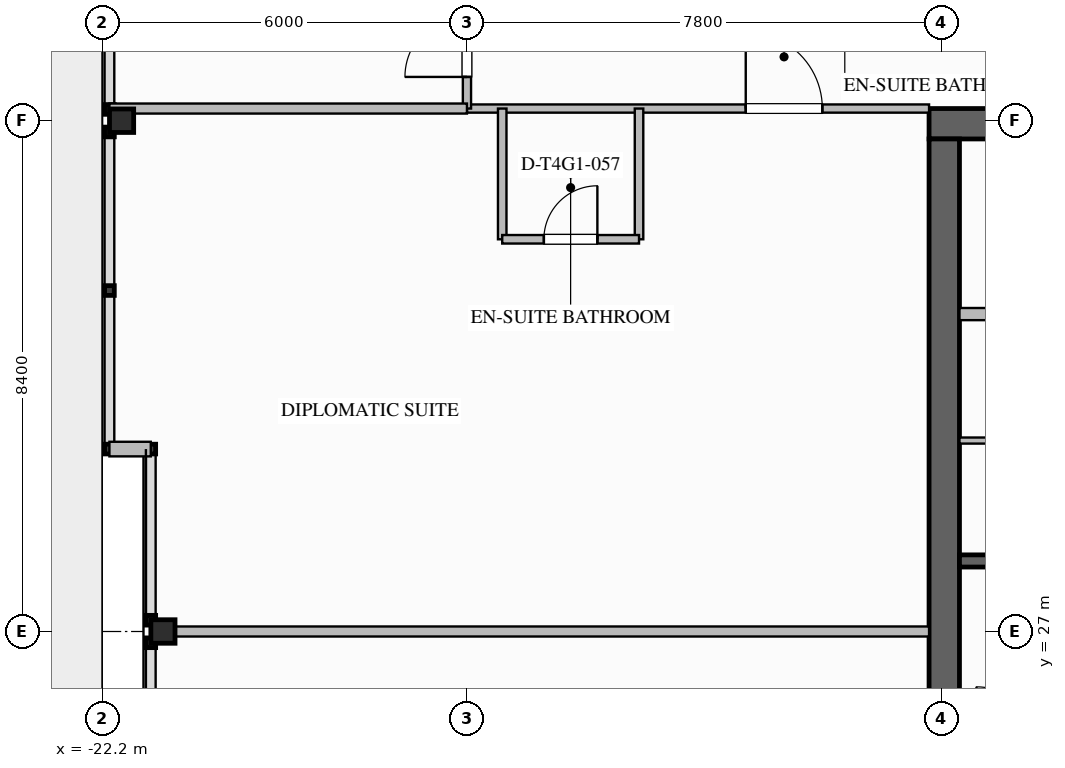
"""IFC4 building model, lengths in metres.
Left out: names, types, materials, properties, quantities, classifications, styles, units other than length and angle.
Written with IfcOpenShell. Run it as: python <this file> out.ifc"""

import sys

from ifc_helpers import new_model, si_unit, direction, frame, frame_2d, origin, origin_2d, place, context, subcontext, project, spatial, rectangle, i_section, extrude, element, fill, save


model = new_model("IFC4")
c1 = context("Model", 3, precision=1e-05, world=origin(), true_north=direction((0.0, 1.0)))
c2 = subcontext(c1, "Body", "Model", "MODEL_VIEW")
j1 = project(units=[si_unit("LENGTHUNIT", "METRE"), si_unit("PLANEANGLEUNIT", "RADIAN")], contexts=[c1])
p1 = place(None, origin())
s1 = spatial("IfcSite", under=j1, at=p1, CompositionType="ELEMENT")
p2 = place(p1, origin())
s2 = spatial("IfcBuilding", under=s1, at=p2, CompositionType="ELEMENT")
p3 = place(p2, frame((0.0, 0.0, 205.1)))
s3 = spatial("IfcBuildingStorey", under=s2, at=p3, CompositionType="ELEMENT", Elevation=205.1)
p4 = place(p3, frame((-8.6, 35.35, 0.0), z_axis=(0.0, 0.0, 1.0), x_axis=(1.0, 0.0, 0.0)))
e1 = element("IfcWall", 1, at=p4, inside=s3, PredefinedType="SHEAR", context=c2, shape_type="SweptSolid", body=[
    extrude(rectangle(XDim=17.2, YDim=0.5, at=frame_2d((8.6, 0.0))), origin(), (0.0, 0.0, 1.0), 3.6),
])
p5 = place(p3, frame((-8.35, 18.9, 0.0), z_axis=(0.0, 0.0, 1.0), x_axis=(0.0, 1.0, 0.0)))
e2 = element("IfcWall", 2, at=p5, inside=s3, PredefinedType="SHEAR", context=c2, shape_type="SweptSolid", body=[
    extrude(rectangle(XDim=16.2, YDim=0.5, at=frame_2d((8.1, 0.0))), origin(), (0.0, 0.0, 1.0), 3.6),
])
for number, where, z_axis, x_axis in (
    (3, (-21.2, 27.0, -0.26), (0.0, 0.0, 1.0), (1.0, 0.0, 0.0)),
    (4, (-21.88, 35.4, -0.26), (0.0, 0.0, 1.0), (1.0, 0.0, 0.0)),
):
    element("IfcColumn", number, at=place(p3, frame(where, z_axis=z_axis, x_axis=x_axis)), inside=s3, PredefinedType="COLUMN", context=c2, shape_type="SweptSolid", body=[
        extrude(i_section(OverallWidth=0.397, OverallDepth=0.387, WebThickness=0.021, FlangeThickness=0.033, FilletRadius=0.025, at=origin_2d()), origin(), (0.0, 0.0, 1.0), 3.857),
    ])
p6 = place(p3, frame((-21.4, 30.0, 0.0), z_axis=(0.0, 0.0, 1.0), x_axis=(-1.0, 0.0, 0.0)))
e5 = element("IfcWall", 5, at=p6, inside=s3, PredefinedType="STANDARD", context=c2, shape_type="SweptSolid", body=[
    extrude(rectangle(XDim=0.68, YDim=0.24, at=frame_2d((0.34, 0.0))), origin(), (0.0, 0.0, 1.0), 3.34),
])
p7 = place(p3, frame((-8.1, 28.16, 0.0), z_axis=(0.0, 0.0, 1.0), x_axis=(1.0, 0.0, 0.0)))
e6 = element("IfcWall", 6, at=p7, inside=s3, PredefinedType="SOLIDWALL", context=c2, shape_type="SweptSolid", body=[
    extrude(rectangle(XDim=8.1, YDim=0.2, at=frame_2d((4.05, 0.0))), origin(), (0.0, 0.0, 1.0), 3.34),
])
p8 = place(p3, frame((-8.1, 32.22, 0.0), z_axis=(0.0, 0.0, 1.0), x_axis=(1.0, 0.0, 0.0)))
e7 = element("IfcWall", 7, at=p8, inside=s3, PredefinedType="SOLIDWALL", context=c2, shape_type="SweptSolid", body=[
    extrude(rectangle(XDim=7.1, YDim=0.2, at=frame_2d((3.55, 0.0))), origin(), (0.0, 0.0, 1.0), 3.34),
])
p9 = place(p8, frame((0.95, 0.0, 0.0)))
e8 = element("IfcOpeningElement", 8, at=p9, cuts=e7, PredefinedType="OPENING", context=c2, shape_type="SweptSolid", body=[
    extrude(rectangle(XDim=1.1, YDim=2.2, at=frame_2d((0.55, 1.1))), frame((0.0, 0.11, 0.0), z_axis=(0.0, -1.0, 0.0), x_axis=(1.0, 0.0, 0.0)), (0.0, 0.0, 1.0), 0.22),
])
p10 = place(p8, frame((3.27, 0.0, 0.0)))
e9 = element("IfcOpeningElement", 9, at=p10, cuts=e7, PredefinedType="OPENING", context=c2, shape_type="SweptSolid", body=[
    extrude(rectangle(XDim=1.1, YDim=2.2, at=frame_2d((0.55, 1.1))), frame((0.0, 0.11, 0.0), z_axis=(0.0, -1.0, 0.0), x_axis=(1.0, 0.0, 0.0)), (0.0, 0.0, 1.0), 0.22),
])
p11 = place(p8, frame((5.59, 0.0, 0.0)))
e10 = element("IfcOpeningElement", 10, at=p11, cuts=e7, PredefinedType="OPENING", context=c2, shape_type="SweptSolid", body=[
    extrude(rectangle(XDim=1.1, YDim=2.2, at=frame_2d((0.55, 1.1))), frame((0.0, 0.11, 0.0), z_axis=(0.0, -1.0, 0.0), x_axis=(1.0, 0.0, 0.0)), (0.0, 0.0, 1.0), 0.22),
])
p12 = place(p3, frame((-8.1, 30.14, 0.0), z_axis=(0.0, 0.0, 1.0), x_axis=(1.0, 0.0, 0.0)))
e11 = element("IfcWall", 11, at=p12, inside=s3, PredefinedType="PARTITIONING", context=c2, shape_type="SweptSolid", body=[
    extrude(rectangle(XDim=7.1, YDim=0.1, at=frame_2d((3.55, 0.0))), origin(), (0.0, 0.0, 1.0), 3.34),
])
p13 = place(p12, frame((1.1, 0.0, 0.0)))
e12 = element("IfcOpeningElement", 12, at=p13, cuts=e11, PredefinedType="OPENING", context=c2, shape_type="SweptSolid", body=[
    extrude(rectangle(XDim=0.92, YDim=2.1, at=frame_2d((0.46, 1.05))), frame((0.0, 0.06, 0.0), z_axis=(0.0, -1.0, 0.0), x_axis=(1.0, 0.0, 0.0)), (0.0, 0.0, 1.0), 0.12),
])
p14 = place(p12, frame((4.6, 0.0, 0.0)))
e13 = element("IfcOpeningElement", 13, at=p14, cuts=e11, PredefinedType="OPENING", context=c2, shape_type="SweptSolid", body=[
    extrude(rectangle(XDim=0.92, YDim=2.1, at=frame_2d((0.46, 1.05))), frame((0.0, 0.06, 0.0), z_axis=(0.0, -1.0, 0.0), x_axis=(1.0, 0.0, 0.0)), (0.0, 0.0, 1.0), 0.12),
])
p15 = place(p3, frame((-16.2, 35.6, 0.0), z_axis=(0.0, 0.0, 1.0), x_axis=(1.0, 0.0, 0.0)))
e14 = element("IfcWall", 14, at=p15, inside=s3, PredefinedType="PARTITIONING", context=c2, shape_type="SweptSolid", body=[
    extrude(rectangle(XDim=7.6, YDim=0.135, at=frame_2d((3.8, 0.0))), origin(), (0.0, 0.0, 1.0), 2.717),
])
p16 = place(p15, frame((4.585, 0.0, 0.0)))
e15 = element("IfcOpeningElement", 15, at=p16, cuts=e14, PredefinedType="OPENING", context=c2, shape_type="SweptSolid", body=[
    extrude(rectangle(XDim=1.26, YDim=2.2, at=frame_2d((0.63, 1.1))), frame((0.0, 0.077, 0.0), z_axis=(0.0, -1.0, 0.0), x_axis=(1.0, 0.0, 0.0)), (0.0, 0.0, 1.0), 0.155),
])
p17 = place(p3, frame((-16.2, 35.6, 0.0), z_axis=(0.0, 0.0, 1.0), x_axis=(0.0, 1.0, 0.0)))
e16 = element("IfcWall", 16, at=p17, inside=s3, PredefinedType="PARTITIONING", context=c2, shape_type="SweptSolid", body=[
    extrude(rectangle(XDim=2.1, YDim=0.135, at=frame_2d((1.05, 0.0))), origin(), (0.0, 0.0, 1.0), 2.714),
])
p18 = place(p17, frame((0.52, 0.0, 0.0)))
e17 = element("IfcOpeningElement", 17, at=p18, cuts=e16, PredefinedType="OPENING", context=c2, shape_type="SweptSolid", body=[
    extrude(rectangle(XDim=1.02, YDim=2.15, at=frame_2d((0.51, 1.075))), frame((0.0, 0.077, 0.0), z_axis=(0.0, -1.0, 0.0), x_axis=(1.0, 0.0, 0.0)), (0.0, 0.0, 1.0), 0.155),
])
p19 = place(p3, frame((-22.08, 35.6, 0.0), z_axis=(0.0, 0.0, 1.0), x_axis=(1.0, 0.0, 0.0)))
e18 = element("IfcWall", 18, at=p19, inside=s3, PredefinedType="PARTITIONING", context=c2, shape_type="SweptSolid", body=[
    extrude(rectangle(XDim=5.88, YDim=0.165, at=frame_2d((2.94, 0.0))), origin(), (0.0, 0.0, 1.0), 2.714),
])
p20 = place(p3, frame((-21.4, 27.0, 0.0), z_axis=(0.0, 0.0, 1.0), x_axis=(1.0, 0.0, 0.0)))
e19 = element("IfcWall", 19, at=p20, inside=s3, PredefinedType="PARTITIONING", context=c2, shape_type="SweptSolid", body=[
    extrude(rectangle(XDim=12.8, YDim=0.165, at=frame_2d((6.4, 0.0))), origin(), (0.0, 0.0, 1.0), 2.714),
])
for number, where, z_axis, x_axis in (
    (20, (-15.62, 35.6, 0.0), (0.0, 0.0, 1.0), (0.0, -1.0, 0.0)),
    (21, (-13.37, 35.6, 0.0), (0.0, 0.0, 1.0), (0.0, -1.0, 0.0)),
):
    element("IfcWall", number, at=place(p3, frame(where, z_axis=z_axis, x_axis=x_axis)), inside=s3, PredefinedType="PLUMBINGWALL", context=c2, shape_type="SweptSolid", body=[
        extrude(rectangle(XDim=2.15, YDim=0.14, at=frame_2d((1.075, 0.0))), origin(), (0.0, 0.0, 1.0), 3.34),
    ])
p21 = place(p3, frame((-15.62, 33.45, 0.0), z_axis=(0.0, 0.0, 1.0), x_axis=(1.0, 0.0, 0.0)))
e22 = element("IfcWall", 22, at=p21, inside=s3, PredefinedType="PLUMBINGWALL", context=c2, shape_type="SweptSolid", body=[
    extrude(rectangle(XDim=2.25, YDim=0.14, at=frame_2d((1.125, 0.0))), origin(), (0.0, 0.0, 1.0), 3.34),
])
p22 = place(p21, frame((0.685, 0.0, 0.0)))
e23 = element("IfcOpeningElement", 23, at=p22, cuts=e22, PredefinedType="OPENING", context=c2, shape_type="SweptSolid", body=[
    extrude(rectangle(XDim=0.88, YDim=2.1, at=frame_2d((0.44, 1.05))), frame((0.0, 0.08, 0.0), z_axis=(0.0, -1.0, 0.0), x_axis=(1.0, 0.0, 0.0)), (0.0, 0.0, 1.0), 0.16),
])
p23 = place(p18, origin())
e24 = element("IfcDoor", 24, at=p23, inside=s3, OperationType="SINGLE_SWING_LEFT", PredefinedType="DOOR", context=c2, shape_type="SweptSolid", body=[
    extrude(rectangle(XDim=1.02, YDim=2.15, at=frame_2d((0.51, 1.075))), frame((0.0, 0.025, 0.0), z_axis=(0.0, -1.0, 0.0), x_axis=(1.0, 0.0, 0.0)), (0.0, 0.0, 1.0), 0.05),
])
fill(e17, e24)
p24 = place(p22, origin())
e25 = element("IfcDoor", 25, at=p24, inside=s3, OperationType="SINGLE_SWING_RIGHT", PredefinedType="DOOR", context=c2, shape_type="SweptSolid", body=[
    extrude(rectangle(XDim=0.88, YDim=2.1, at=frame_2d((0.44, 1.05))), frame((0.0, 0.025, 0.0), z_axis=(0.0, -1.0, 0.0), x_axis=(1.0, 0.0, 0.0)), (0.0, 0.0, 1.0), 0.05),
])
fill(e23, e25)
p25 = place(p16, origin())
e26 = element("IfcDoor", 26, at=p25, inside=s3, OperationType="SINGLE_SWING_LEFT", PredefinedType="DOOR", context=c2, shape_type="SweptSolid", body=[
    extrude(rectangle(XDim=1.26, YDim=2.2, at=frame_2d((0.63, 1.1))), frame((0.0, 0.025, 0.0), z_axis=(0.0, -1.0, 0.0), x_axis=(1.0, 0.0, 0.0)), (0.0, 0.0, 1.0), 0.05),
])
fill(e15, e26)
save(model, sys.argv[1])
